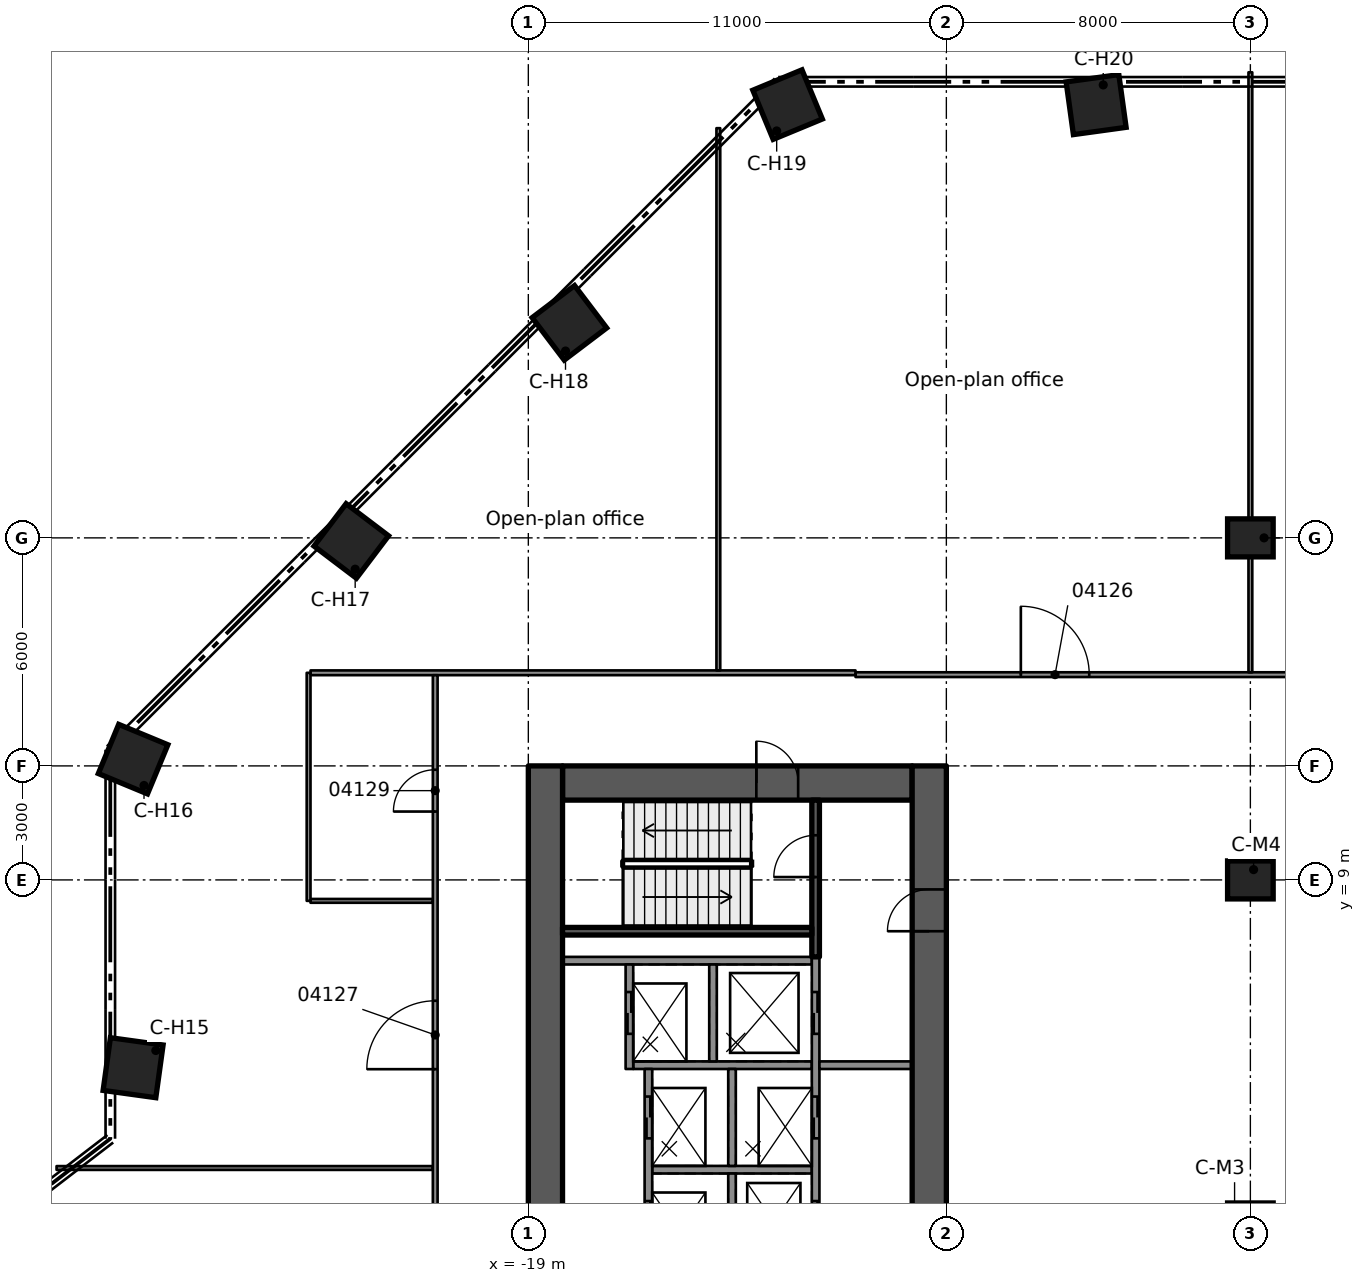
"""IFC4 building model, lengths in metres.
Left out: names, types, materials, properties, quantities, classifications, styles, units other than length and angle.
Written with IfcOpenShell. Run it as: python <this file> out.ifc"""

import sys

from ifc_helpers import new_model, si_unit, direction, frame, frame_2d, origin, origin_2d, place, context, subcontext, project, spatial, rectangle, extrude, element, fill, save


model = new_model("IFC4")
c1 = context("Model", 3, precision=1e-05, world=origin(), true_north=direction((0.0, 1.0)))
c2 = subcontext(c1, "Body", "Model", "MODEL_VIEW")
j1 = project(units=[si_unit("LENGTHUNIT", "METRE"), si_unit("PLANEANGLEUNIT", "RADIAN")], contexts=[c1])
p1 = place(None, origin())
s1 = spatial("IfcSite", under=j1, at=p1, CompositionType="ELEMENT")
p2 = place(p1, origin())
s2 = spatial("IfcBuilding", under=s1, at=p2, CompositionType="ELEMENT")
p3 = place(p2, frame((0.0, 0.0, 20.5)))
s3 = spatial("IfcBuildingStorey", under=s2, at=p3, CompositionType="ELEMENT", Elevation=20.5)
p4 = place(p3, frame((-18.1, 11.55, 0.0), z_axis=(0.0, 0.0, 1.0), x_axis=(1.0, 0.0, 0.0)))
e1 = element("IfcWall", 1, at=p4, inside=s3, PredefinedType="SHEAR", context=c2, shape_type="SweptSolid", body=[
    extrude(rectangle(XDim=9.2, YDim=0.9, at=frame_2d((4.6, 0.0))), origin(), (0.0, 0.0, 1.0), 4.6),
])
p5 = place(p4, frame((5.1, 0.0, 0.0)))
e2 = element("IfcOpeningElement", 2, at=p5, cuts=e1, PredefinedType="OPENING", context=c2, shape_type="SweptSolid", body=[
    extrude(rectangle(XDim=1.1, YDim=2.1, at=frame_2d((0.55, 1.05))), frame((0.0, 0.46, 0.0), z_axis=(0.0, -1.0, 0.0), x_axis=(1.0, 0.0, 0.0)), (0.0, 0.0, 1.0), 0.92),
])
p6 = place(p3, frame((-18.55, -12.0, 0.0), z_axis=(0.0, 0.0, 1.0), x_axis=(0.0, 1.0, 0.0)))
e3 = element("IfcWall", 3, at=p6, inside=s3, PredefinedType="SHEAR", context=c2, shape_type="SweptSolid", body=[
    extrude(rectangle(XDim=24.0, YDim=0.9, at=frame_2d((12.0, 0.0))), origin(), (0.0, 0.0, 1.0), 4.6),
])
p7 = place(p6, frame((10.1, 0.0, 0.0)))
e4 = element("IfcOpeningElement", 4, at=p7, cuts=e3, PredefinedType="OPENING", context=c2, shape_type="SweptSolid", body=[
    extrude(rectangle(XDim=1.8, YDim=2.1, at=frame_2d((0.9, 1.05))), frame((0.0, 0.46, 0.0), z_axis=(0.0, -1.0, 0.0), x_axis=(1.0, 0.0, 0.0)), (0.0, 0.0, 1.0), 0.92),
])
p8 = place(p3, frame((-8.45, -12.0, 0.0), z_axis=(0.0, 0.0, 1.0), x_axis=(0.0, 1.0, 0.0)))
e5 = element("IfcWall", 5, at=p8, inside=s3, PredefinedType="SHEAR", context=c2, shape_type="SweptSolid", body=[
    extrude(rectangle(XDim=24.0, YDim=0.9, at=frame_2d((12.0, 0.0))), origin(), (0.0, 0.0, 1.0), 4.6),
])
p9 = place(p8, frame((9.6, 0.0, 0.0)))
e6 = element("IfcOpeningElement", 6, at=p9, cuts=e5, PredefinedType="OPENING", context=c2, shape_type="SweptSolid", body=[
    extrude(rectangle(XDim=1.8, YDim=2.1, at=frame_2d((0.9, 1.05))), frame((0.0, 0.46, 0.0), z_axis=(0.0, -1.0, 0.0), x_axis=(1.0, 0.0, 0.0)), (0.0, 0.0, 1.0), 0.92),
])
p10 = place(p8, frame((19.65, 0.0, 0.0)))
e7 = element("IfcOpeningElement", 7, at=p10, cuts=e5, PredefinedType="OPENING", context=c2, shape_type="SweptSolid", body=[
    extrude(rectangle(XDim=1.1, YDim=2.1, at=frame_2d((0.55, 1.05))), frame((0.0, 0.46, 0.0), z_axis=(0.0, -1.0, 0.0), x_axis=(1.0, 0.0, 0.0)), (0.0, 0.0, 1.0), 0.92),
])
for number, where, z_axis, x_axis in (
    (8, (-29.4, 4.059, 0.0), (0.0, 0.0, 1.0), (-0.991, 0.137, 0.0)),
    (9, (-29.4, 12.178, 0.0), (0.0, 0.0, 1.0), (-0.924, 0.383, 0.0)),
    (10, (-23.659, 17.919, 0.0), (0.0, 0.0, 1.0), (-0.797, 0.604, 0.0)),
    (11, (-17.919, 23.659, 0.0), (0.0, 0.0, 1.0), (-0.604, 0.797, 0.0)),
    (12, (-12.178, 29.4, 0.0), (0.0, 0.0, 1.0), (-0.383, 0.924, 0.0)),
    (13, (-4.059, 29.4, 0.0), (0.0, 0.0, 1.0), (-0.137, 0.991, 0.0)),
):
    element("IfcColumn", number, at=place(p3, frame(where, z_axis=z_axis, x_axis=x_axis)), inside=s3, PredefinedType="COLUMN", context=c2, shape_type="SweptSolid", body=[
        extrude(rectangle(XDim=1.4, YDim=1.4, at=origin_2d()), origin(), (0.0, 0.0, 1.0), 4.6),
    ])
for number, where, z_axis, x_axis in (
    (14, (0.0, 0.0, 0.0), (0.0, 0.0, 1.0), (1.0, 0.0, 0.0)),
    (15, (0.0, 9.0, 0.0), (0.0, 0.0, 1.0), (1.0, 0.0, 0.0)),
    (16, (0.0, 18.0, 0.0), (0.0, 0.0, 1.0), (1.0, 0.0, 0.0)),
):
    element("IfcColumn", number, at=place(p3, frame(where, z_axis=z_axis, x_axis=x_axis)), inside=s3, PredefinedType="COLUMN", context=c2, shape_type="SweptSolid", body=[
        extrude(rectangle(XDim=1.2, YDim=1.0, at=origin_2d()), origin(), (0.0, 0.0, 1.0), 4.6),
    ])
p11 = place(p3, frame((-11.54, 6.875, 0.0), z_axis=(0.0, 0.0, 1.0), x_axis=(-1.0, 0.0, 0.0)))
e17 = element("IfcWall", 17, at=p11, inside=s3, PredefinedType="SOLIDWALL", context=c2, shape_type="SweptSolid", body=[
    extrude(rectangle(XDim=6.56, YDim=0.2, at=frame_2d((3.28, 0.0))), origin(), (0.0, 0.0, 1.0), 4.18),
])
p12 = place(p3, frame((-11.54, 1.375, 0.0), z_axis=(0.0, 0.0, 1.0), x_axis=(-1.0, 0.0, 0.0)))
e18 = element("IfcWall", 18, at=p12, inside=s3, PredefinedType="SOLIDWALL", context=c2, shape_type="SweptSolid", body=[
    extrude(rectangle(XDim=4.2, YDim=0.2, at=frame_2d((2.1, 0.0))), origin(), (0.0, 0.0, 1.0), 4.18),
])
p13 = place(p3, frame((-11.54, 4.125, 0.0), z_axis=(0.0, 0.0, 1.0), x_axis=(-1.0, 0.0, 0.0)))
e19 = element("IfcWall", 19, at=p13, inside=s3, PredefinedType="SOLIDWALL", context=c2, shape_type="SweptSolid", body=[
    extrude(rectangle(XDim=4.7, YDim=0.2, at=frame_2d((2.35, 0.0))), origin(), (0.0, 0.0, 1.0), 4.18),
])
p14 = place(p3, frame((-11.44, -6.975, 0.0), z_axis=(0.0, 0.0, 1.0), x_axis=(0.0, 1.0, 0.0)))
e20 = element("IfcWall", 20, at=p14, inside=s3, PredefinedType="SOLIDWALL", context=c2, shape_type="SweptSolid", body=[
    extrude(rectangle(XDim=13.95, YDim=0.2, at=frame_2d((6.975, 0.0))), origin(), (0.0, 0.0, 1.0), 4.18),
])
p15 = place(p14, frame((0.925, 0.0, 0.0)))
e21 = element("IfcOpeningElement", 21, at=p15, cuts=e20, PredefinedType="OPENING", context=c2, shape_type="SweptSolid", body=[
    extrude(rectangle(XDim=1.1, YDim=2.1, at=frame_2d((0.55, 1.05))), frame((0.0, 0.11, 0.0), z_axis=(0.0, -1.0, 0.0), x_axis=(1.0, 0.0, 0.0)), (0.0, 0.0, 1.0), 0.22),
])
p16 = place(p14, frame((6.425, 0.0, 0.0)))
e22 = element("IfcOpeningElement", 22, at=p16, cuts=e20, PredefinedType="OPENING", context=c2, shape_type="SweptSolid", body=[
    extrude(rectangle(XDim=1.1, YDim=2.1, at=frame_2d((0.55, 1.05))), frame((0.0, 0.11, 0.0), z_axis=(0.0, -1.0, 0.0), x_axis=(1.0, 0.0, 0.0)), (0.0, 0.0, 1.0), 0.22),
])
p17 = place(p14, frame((9.175, 0.0, 0.0)))
e23 = element("IfcOpeningElement", 23, at=p17, cuts=e20, PredefinedType="OPENING", context=c2, shape_type="SweptSolid", body=[
    extrude(rectangle(XDim=1.1, YDim=2.1, at=frame_2d((0.55, 1.05))), frame((0.0, 0.11, 0.0), z_axis=(0.0, -1.0, 0.0), x_axis=(1.0, 0.0, 0.0)), (0.0, 0.0, 1.0), 0.22),
])
p18 = place(p14, frame((11.925, 0.0, 0.0)))
e24 = element("IfcOpeningElement", 24, at=p18, cuts=e20, PredefinedType="OPENING", context=c2, shape_type="SweptSolid", body=[
    extrude(rectangle(XDim=1.1, YDim=2.1, at=frame_2d((0.55, 1.05))), frame((0.0, 0.11, 0.0), z_axis=(0.0, -1.0, 0.0), x_axis=(1.0, 0.0, 0.0)), (0.0, 0.0, 1.0), 0.22),
])
for number, where, z_axis, x_axis in (
    (25, (-13.64, -1.275, 0.0), (0.0, 0.0, 1.0), (0.0, 1.0, 0.0)),
    (26, (-13.64, 1.475, 0.0), (0.0, 0.0, 1.0), (0.0, 1.0, 0.0)),
    (27, (-14.14, 4.225, 0.0), (0.0, 0.0, 1.0), (0.0, 1.0, 0.0)),
):
    element("IfcWall", number, at=place(p3, frame(where, z_axis=z_axis, x_axis=x_axis)), inside=s3, PredefinedType="SOLIDWALL", context=c2, shape_type="SweptSolid", body=[
        extrude(rectangle(XDim=2.55, YDim=0.2, at=frame_2d((1.275, 0.0))), origin(), (0.0, 0.0, 1.0), 4.18),
    ])
p19 = place(p3, frame((-15.84, -4.025, 0.0), z_axis=(0.0, 0.0, 1.0), x_axis=(0.0, 1.0, 0.0)))
e28 = element("IfcWall", 28, at=p19, inside=s3, PredefinedType="SOLIDWALL", context=c2, shape_type="SweptSolid", body=[
    extrude(rectangle(XDim=8.05, YDim=0.2, at=frame_2d((4.025, 0.0))), origin(), (0.0, 0.0, 1.0), 4.18),
])
p20 = place(p19, frame((3.475, 0.0, 0.0)))
e29 = element("IfcOpeningElement", 29, at=p20, cuts=e28, PredefinedType="OPENING", context=c2, shape_type="SweptSolid", body=[
    extrude(rectangle(XDim=1.1, YDim=2.1, at=frame_2d((0.55, 1.05))), frame((0.0, 0.11, 0.0), z_axis=(0.0, -1.0, 0.0), x_axis=(1.0, 0.0, 0.0)), (0.0, 0.0, 1.0), 0.22),
])
p21 = place(p19, frame((6.225, 0.0, 0.0)))
e30 = element("IfcOpeningElement", 30, at=p21, cuts=e28, PredefinedType="OPENING", context=c2, shape_type="SweptSolid", body=[
    extrude(rectangle(XDim=1.1, YDim=2.1, at=frame_2d((0.55, 1.05))), frame((0.0, 0.11, 0.0), z_axis=(0.0, -1.0, 0.0), x_axis=(1.0, 0.0, 0.0)), (0.0, 0.0, 1.0), 0.22),
])
p22 = place(p3, frame((-16.34, 4.025, 0.0), z_axis=(0.0, 0.0, 1.0), x_axis=(0.0, 1.0, 0.0)))
e31 = element("IfcWall", 31, at=p22, inside=s3, PredefinedType="SOLIDWALL", context=c2, shape_type="SweptSolid", body=[
    extrude(rectangle(XDim=2.75, YDim=0.2, at=frame_2d((1.375, 0.0))), origin(), (0.0, 0.0, 1.0), 4.18),
])
p23 = place(p22, frame((0.925, 0.0, 0.0)))
e32 = element("IfcOpeningElement", 32, at=p23, cuts=e31, PredefinedType="OPENING", context=c2, shape_type="SweptSolid", body=[
    extrude(rectangle(XDim=1.1, YDim=2.1, at=frame_2d((0.55, 1.05))), frame((0.0, 0.11, 0.0), z_axis=(0.0, -1.0, 0.0), x_axis=(1.0, 0.0, 0.0)), (0.0, 0.0, 1.0), 0.22),
])
p24 = place(p3, frame((-11.44, 6.975, 0.0), z_axis=(0.0, 0.0, 1.0), x_axis=(0.0, 1.0, 0.0)))
e33 = element("IfcWall", 33, at=p24, inside=s3, PredefinedType="SOLIDWALL", context=c2, shape_type="SweptSolid", body=[
    extrude(rectangle(XDim=4.125, YDim=0.2, at=frame_2d((2.062, 0.0))), origin(), (0.0, 0.0, 1.0), 4.18),
])
p25 = place(p24, frame((2.1, 0.0, 0.0)))
e34 = element("IfcOpeningElement", 34, at=p25, cuts=e33, PredefinedType="OPENING", context=c2, shape_type="SweptSolid", body=[
    extrude(rectangle(XDim=1.1, YDim=2.1, at=frame_2d((0.55, 1.05))), frame((0.0, 0.11, 0.0), z_axis=(0.0, -1.0, 0.0), x_axis=(1.0, 0.0, 0.0)), (0.0, 0.0, 1.0), 0.22),
])
p26 = place(p3, frame((-11.54, 7.65, 0.0), z_axis=(0.0, 0.0, 1.0), x_axis=(-1.0, 0.0, 0.0)))
e35 = element("IfcWall", 35, at=p26, inside=s3, PredefinedType="SOLIDWALL", context=c2, shape_type="SweptSolid", body=[
    extrude(rectangle(XDim=6.56, YDim=0.2, at=frame_2d((3.28, 0.0))), origin(), (0.0, 0.0, 1.0), 4.18),
])
p27 = place(p3, frame((-8.9, 4.125, 0.0), z_axis=(0.0, 0.0, 1.0), x_axis=(-1.0, 0.0, 0.0)))
e36 = element("IfcWall", 36, at=p27, inside=s3, PredefinedType="PARTITIONING", context=c2, shape_type="SweptSolid", body=[
    extrude(rectangle(XDim=2.44, YDim=0.2, at=frame_2d((1.22, 0.0))), origin(), (0.0, 0.0, 1.0), 4.18),
])
p28 = place(p3, frame((-31.414, 1.42, 0.0), z_axis=(0.0, 0.0, 1.0), x_axis=(1.0, 0.0, 0.0)))
e37 = element("IfcWall", 37, at=p28, inside=s3, PredefinedType="PARTITIONING", context=c2, shape_type="SweptSolid", body=[
    extrude(rectangle(XDim=9.902, YDim=0.1, at=frame_2d((4.951, 0.0))), origin(), (0.0, 0.0, 1.0), 4.16),
])
p29 = place(p3, frame((-24.732, 8.449, 0.0), z_axis=(0.0, 0.0, 1.0), x_axis=(1.0, 0.0, 0.0)))
e38 = element("IfcWall", 38, at=p29, inside=s3, PredefinedType="PARTITIONING", context=c2, shape_type="SweptSolid", body=[
    extrude(rectangle(XDim=3.22, YDim=0.1, at=frame_2d((1.61, 0.0))), origin(), (0.0, 0.0, 1.0), 4.16),
])
p30 = place(p3, frame((-10.39, 14.401, 0.0), z_axis=(0.0, 0.0, 1.0), x_axis=(1.0, 0.0, 0.0)))
e39 = element("IfcWall", 39, at=p30, inside=s3, PredefinedType="PARTITIONING", context=c2, shape_type="SweptSolid", body=[
    extrude(rectangle(XDim=20.781, YDim=0.125, at=frame_2d((10.391, 0.0))), origin(), (0.0, 0.0, 1.0), 4.16),
])
p31 = place(p30, frame((14.74, 0.0, 0.0)))
e40 = element("IfcOpeningElement", 40, at=p31, cuts=e39, PredefinedType="OPENING", context=c2, shape_type="SweptSolid", body=[
    extrude(rectangle(XDim=1.8, YDim=2.1, at=frame_2d((0.9, 1.05))), frame((0.0, 0.073, 0.0), z_axis=(0.0, -1.0, 0.0), x_axis=(1.0, 0.0, 0.0)), (0.0, 0.0, 1.0), 0.145),
])
p32 = place(p30, frame((4.35, 0.0, 0.0)))
e41 = element("IfcOpeningElement", 41, at=p32, cuts=e39, PredefinedType="OPENING", context=c2, shape_type="SweptSolid", body=[
    extrude(rectangle(XDim=1.8, YDim=2.1, at=frame_2d((0.9, 1.05))), frame((0.0, 0.073, 0.0), z_axis=(0.0, -1.0, 0.0), x_axis=(1.0, 0.0, 0.0)), (0.0, 0.0, 1.0), 0.145),
])
p33 = place(p3, frame((-24.731, 14.45, 0.0), z_axis=(0.0, 0.0, 1.0), x_axis=(1.0, 0.0, 0.0)))
e42 = element("IfcWall", 42, at=p33, inside=s3, PredefinedType="PARTITIONING", context=c2, shape_type="SweptSolid", body=[
    extrude(rectangle(XDim=14.34, YDim=0.125, at=frame_2d((7.17, 0.0))), origin(), (0.0, 0.0, 1.0), 4.16),
])
p34 = place(p3, frame((0.0, 14.463, 0.0), z_axis=(0.0, 0.0, 1.0), x_axis=(0.0, 1.0, 0.0)))
e43 = element("IfcWall", 43, at=p34, inside=s3, PredefinedType="PARTITIONING", context=c2, shape_type="SweptSolid", body=[
    extrude(rectangle(XDim=15.787, YDim=0.1, at=frame_2d((7.894, 0.0))), origin(), (0.0, 0.0, 1.0), 4.16),
])
p35 = place(p3, frame((-14.0, 14.514, 0.0), z_axis=(0.0, 0.0, 1.0), x_axis=(0.0, 1.0, 0.0)))
e44 = element("IfcWall", 44, at=p35, inside=s3, PredefinedType="PARTITIONING", context=c2, shape_type="SweptSolid", body=[
    extrude(rectangle(XDim=14.266, YDim=0.1, at=frame_2d((7.133, 0.0))), origin(), (0.0, 0.0, 1.0), 4.16),
])
p36 = place(p3, frame((-21.45, -11.607, 0.0), z_axis=(0.0, 0.0, 1.0), x_axis=(0.0, 1.0, 0.0)))
e45 = element("IfcWall", 45, at=p36, inside=s3, PredefinedType="PARTITIONING", context=c2, shape_type="SweptSolid", body=[
    extrude(rectangle(XDim=25.993, YDim=0.125, at=frame_2d((12.997, 0.0))), origin(), (0.0, 0.0, 1.0), 4.16),
])
p37 = place(p36, frame((5.6, 0.0, 0.0)))
e46 = element("IfcOpeningElement", 46, at=p37, cuts=e45, PredefinedType="OPENING", context=c2, shape_type="SweptSolid", body=[
    extrude(rectangle(XDim=1.8, YDim=2.1, at=frame_2d((0.9, 1.05))), frame((0.0, 0.073, 0.0), z_axis=(0.0, -1.0, 0.0), x_axis=(1.0, 0.0, 0.0)), (0.0, 0.0, 1.0), 0.145),
])
p38 = place(p36, frame((15.627, 0.0, 0.0)))
e47 = element("IfcOpeningElement", 47, at=p38, cuts=e45, PredefinedType="OPENING", context=c2, shape_type="SweptSolid", body=[
    extrude(rectangle(XDim=1.8, YDim=2.1, at=frame_2d((0.9, 1.05))), frame((0.0, 0.073, 0.0), z_axis=(0.0, -1.0, 0.0), x_axis=(1.0, 0.0, 0.0)), (0.0, 0.0, 1.0), 0.145),
])
p39 = place(p36, frame((22.406, 0.0, 0.0)))
e48 = element("IfcOpeningElement", 48, at=p39, cuts=e45, PredefinedType="OPENING", context=c2, shape_type="SweptSolid", body=[
    extrude(rectangle(XDim=1.1, YDim=2.1, at=frame_2d((0.55, 1.05))), frame((0.0, 0.073, 0.0), z_axis=(0.0, -1.0, 0.0), x_axis=(1.0, 0.0, 0.0)), (0.0, 0.0, 1.0), 0.145),
])
p40 = place(p3, frame((-24.782, 8.449, 0.0), z_axis=(0.0, 0.0, 1.0), x_axis=(0.0, 1.0, 0.0)))
e49 = element("IfcWall", 49, at=p40, inside=s3, PredefinedType="PARTITIONING", context=c2, shape_type="SweptSolid", body=[
    extrude(rectangle(XDim=6.0, YDim=0.1, at=frame_2d((3.0, 0.0))), origin(), (0.0, 0.0, 1.0), 4.16),
])
p41 = place(p16, origin())
e50 = element("IfcDoor", 50, at=p41, inside=s3, OperationType="DOUBLE_DOOR_SLIDING", PredefinedType="DOOR", context=c2, shape_type="SweptSolid", body=[
    extrude(rectangle(XDim=1.1, YDim=2.1, at=frame_2d((0.55, 1.05))), frame((0.0, 0.025, 0.0), z_axis=(0.0, -1.0, 0.0), x_axis=(1.0, 0.0, 0.0)), (0.0, 0.0, 1.0), 0.05),
])
fill(e22, e50)
p42 = place(p20, origin())
e51 = element("IfcDoor", 51, at=p42, inside=s3, OperationType="DOUBLE_DOOR_SLIDING", PredefinedType="DOOR", context=c2, shape_type="SweptSolid", body=[
    extrude(rectangle(XDim=1.1, YDim=2.1, at=frame_2d((0.55, 1.05))), frame((0.0, 0.025, 0.0), z_axis=(0.0, -1.0, 0.0), x_axis=(1.0, 0.0, 0.0)), (0.0, 0.0, 1.0), 0.05),
])
fill(e29, e51)
p43 = place(p17, origin())
e52 = element("IfcDoor", 52, at=p43, inside=s3, OperationType="DOUBLE_DOOR_SLIDING", PredefinedType="DOOR", context=c2, shape_type="SweptSolid", body=[
    extrude(rectangle(XDim=1.1, YDim=2.1, at=frame_2d((0.55, 1.05))), frame((0.0, 0.025, 0.0), z_axis=(0.0, -1.0, 0.0), x_axis=(1.0, 0.0, 0.0)), (0.0, 0.0, 1.0), 0.05),
])
fill(e23, e52)
p44 = place(p21, origin())
e53 = element("IfcDoor", 53, at=p44, inside=s3, OperationType="DOUBLE_DOOR_SLIDING", PredefinedType="DOOR", context=c2, shape_type="SweptSolid", body=[
    extrude(rectangle(XDim=1.1, YDim=2.1, at=frame_2d((0.55, 1.05))), frame((0.0, 0.025, 0.0), z_axis=(0.0, -1.0, 0.0), x_axis=(1.0, 0.0, 0.0)), (0.0, 0.0, 1.0), 0.05),
])
fill(e30, e53)
p45 = place(p18, origin())
e54 = element("IfcDoor", 54, at=p45, inside=s3, OperationType="DOUBLE_DOOR_SLIDING", PredefinedType="DOOR", context=c2, shape_type="SweptSolid", body=[
    extrude(rectangle(XDim=1.1, YDim=2.1, at=frame_2d((0.55, 1.05))), frame((0.0, 0.025, 0.0), z_axis=(0.0, -1.0, 0.0), x_axis=(1.0, 0.0, 0.0)), (0.0, 0.0, 1.0), 0.05),
])
fill(e24, e54)
p46 = place(p23, origin())
e55 = element("IfcDoor", 55, at=p46, inside=s3, OperationType="DOUBLE_DOOR_SLIDING", PredefinedType="DOOR", context=c2, shape_type="SweptSolid", body=[
    extrude(rectangle(XDim=1.1, YDim=2.1, at=frame_2d((0.55, 1.05))), frame((0.0, 0.025, 0.0), z_axis=(0.0, -1.0, 0.0), x_axis=(1.0, 0.0, 0.0)), (0.0, 0.0, 1.0), 0.05),
])
fill(e32, e55)
p47 = place(p10, origin())
e56 = element("IfcDoor", 56, at=p47, inside=s3, OperationType="SINGLE_SWING_RIGHT", PredefinedType="DOOR", context=c2, shape_type="SweptSolid", body=[
    extrude(rectangle(XDim=1.1, YDim=2.1, at=frame_2d((0.55, 1.05))), frame((0.0, 0.025, 0.0), z_axis=(0.0, -1.0, 0.0), x_axis=(1.0, 0.0, 0.0)), (0.0, 0.0, 1.0), 0.05),
])
fill(e7, e56)
p48 = place(p5, origin())
e57 = element("IfcDoor", 57, at=p48, inside=s3, OperationType="SINGLE_SWING_RIGHT", PredefinedType="DOOR", context=c2, shape_type="SweptSolid", body=[
    extrude(rectangle(XDim=1.1, YDim=2.1, at=frame_2d((0.55, 1.05))), frame((0.0, 0.025, 0.0), z_axis=(0.0, -1.0, 0.0), x_axis=(1.0, 0.0, 0.0)), (0.0, 0.0, 1.0), 0.05),
])
fill(e2, e57)
p49 = place(p25, origin())
e58 = element("IfcDoor", 58, at=p49, inside=s3, OperationType="SINGLE_SWING_RIGHT", PredefinedType="DOOR", context=c2, shape_type="SweptSolid", body=[
    extrude(rectangle(XDim=1.1, YDim=2.1, at=frame_2d((0.55, 1.05))), frame((0.0, 0.025, 0.0), z_axis=(0.0, -1.0, 0.0), x_axis=(1.0, 0.0, 0.0)), (0.0, 0.0, 1.0), 0.05),
])
fill(e34, e58)
p50 = place(p32, origin())
e59 = element("IfcDoor", 59, at=p50, inside=s3, OperationType="DOUBLE_DOOR_SINGLE_SWING", PredefinedType="DOOR", context=c2, shape_type="SweptSolid", body=[
    extrude(rectangle(XDim=1.8, YDim=2.1, at=frame_2d((0.9, 1.05))), frame((0.0, 0.025, 0.0), z_axis=(0.0, -1.0, 0.0), x_axis=(1.0, 0.0, 0.0)), (0.0, 0.0, 1.0), 0.05),
])
fill(e41, e59)
p51 = place(p38, origin())
e60 = element("IfcDoor", 60, at=p51, inside=s3, OperationType="DOUBLE_DOOR_SINGLE_SWING", PredefinedType="DOOR", context=c2, shape_type="SweptSolid", body=[
    extrude(rectangle(XDim=1.8, YDim=2.1, at=frame_2d((0.9, 1.05))), frame((0.0, 0.025, 0.0), z_axis=(0.0, -1.0, 0.0), x_axis=(1.0, 0.0, 0.0)), (0.0, 0.0, 1.0), 0.05),
])
fill(e47, e60)
p52 = place(p39, origin())
e61 = element("IfcDoor", 61, at=p52, inside=s3, OperationType="SINGLE_SWING_RIGHT", PredefinedType="DOOR", context=c2, shape_type="SweptSolid", body=[
    extrude(rectangle(XDim=1.1, YDim=2.1, at=frame_2d((0.55, 1.05))), frame((0.0, 0.025, 0.0), z_axis=(0.0, -1.0, 0.0), x_axis=(1.0, 0.0, 0.0)), (0.0, 0.0, 1.0), 0.05),
])
fill(e48, e61)
save(model, sys.argv[1])
